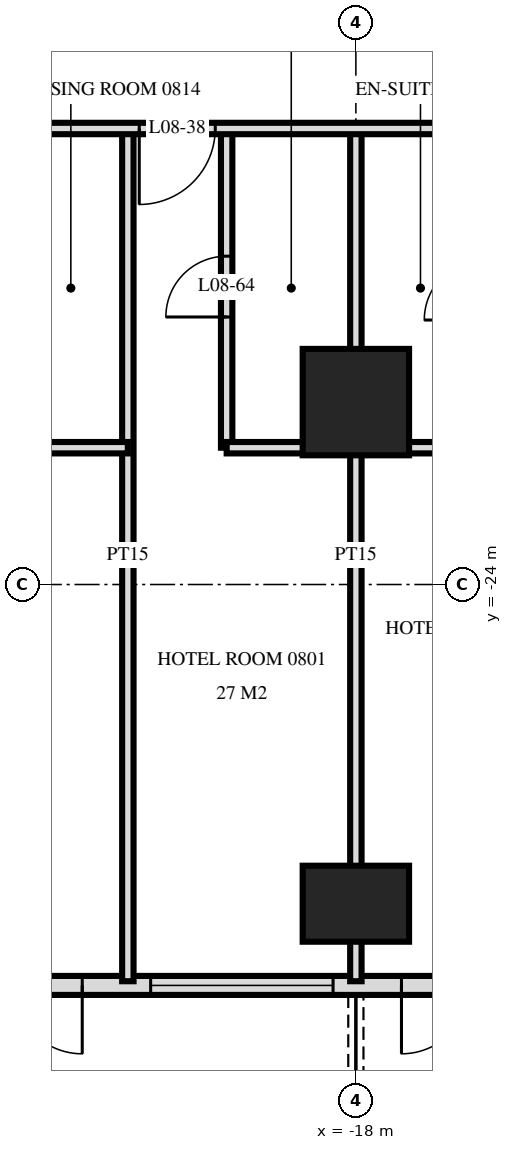
"""IFC4 building model, lengths in metres.
Left out: names, types, materials, properties, quantities, classifications, styles, units other than length and angle.
Written with IfcOpenShell. Run it as: python <this file> out.ifc"""

import sys

from ifc_helpers import new_model, si_unit, direction, frame, frame_2d, origin, origin_2d, place, context, subcontext, project, spatial, rectangle, extrude, element, fill, save


model = new_model("IFC4")
c1 = context("Model", 3, precision=1e-05, world=origin(), true_north=direction((0.0, 1.0)))
c2 = subcontext(c1, "Body", "Model", "MODEL_VIEW")
j1 = project(units=[si_unit("LENGTHUNIT", "METRE"), si_unit("PLANEANGLEUNIT", "RADIAN")], contexts=[c1])
p1 = place(None, origin())
s1 = spatial("IfcSite", under=j1, at=p1, CompositionType="ELEMENT")
p2 = place(p1, origin())
s2 = spatial("IfcBuilding", under=s1, at=p2, CompositionType="ELEMENT")
p3 = place(p2, frame((0.0, 0.0, 38.4)))
s3 = spatial("IfcBuildingStorey", under=s2, at=p3, CompositionType="ELEMENT", Elevation=38.4)
p4 = place(p3, frame((-18.0, -28.2, 0.0), z_axis=(0.0, 0.0, 1.0), x_axis=(1.0, 0.0, 0.0)))
e1 = element("IfcColumn", 1, at=p4, inside=s3, PredefinedType="COLUMN", context=c2, shape_type="SweptSolid", body=[
    extrude(rectangle(XDim=1.4, YDim=1.0, at=origin_2d()), origin(), (0.0, 0.0, 1.0), 3.6),
])
p5 = place(p3, frame((-18.0, -21.6, 0.0), z_axis=(0.0, 0.0, 1.0), x_axis=(1.0, 0.0, 0.0)))
e2 = element("IfcColumn", 2, at=p5, inside=s3, PredefinedType="COLUMN", context=c2, shape_type="SweptSolid", body=[
    extrude(rectangle(XDim=1.4, YDim=1.4, at=origin_2d()), origin(), (0.0, 0.0, 1.0), 3.6),
])
p6 = place(p3, frame((-28.775, -29.275, 0.0), z_axis=(0.0, 0.0, 1.0), x_axis=(1.0, 0.0, 0.0)))
e3 = element("IfcWall", 3, at=p6, inside=s3, PredefinedType="SOLIDWALL", context=c2, shape_type="SweptSolid", body=[
    extrude(rectangle(XDim=57.551, YDim=0.25, at=frame_2d((28.775, 0.0))), origin(), (0.0, 0.0, 1.0), 3.32),
])
p7 = place(p6, frame((0.575, 0.0, 0.0)))
e4 = element("IfcOpeningElement", 4, at=p7, cuts=e3, PredefinedType="OPENING", context=c2, shape_type="SweptSolid", body=[
    extrude(rectangle(XDim=1.8, YDim=2.4, at=frame_2d((0.9, 1.2))), frame((0.0, 0.135, 0.0), z_axis=(0.0, -1.0, 0.0), x_axis=(1.0, 0.0, 0.0)), (0.0, 0.0, 1.0), 0.27),
])
p8 = place(p6, frame((5.375, 0.0, 0.0)))
e5 = element("IfcOpeningElement", 5, at=p8, cuts=e3, PredefinedType="OPENING", context=c2, shape_type="SweptSolid", body=[
    extrude(rectangle(XDim=1.8, YDim=2.4, at=frame_2d((0.9, 1.2))), frame((0.0, 0.135, 0.0), z_axis=(0.0, -1.0, 0.0), x_axis=(1.0, 0.0, 0.0)), (0.0, 0.0, 1.0), 0.27),
])
p9 = place(p6, frame((8.075, 0.0, 0.3)))
e6 = element("IfcOpeningElement", 6, at=p9, cuts=e3, PredefinedType="OPENING", context=c2, shape_type="SweptSolid", body=[
    extrude(rectangle(XDim=2.4, YDim=2.1, at=frame_2d((1.2, 1.05))), frame((0.0, 0.135, 0.0), z_axis=(0.0, -1.0, 0.0), x_axis=(1.0, 0.0, 0.0)), (0.0, 0.0, 1.0), 0.27),
])
p10 = place(p6, frame((11.375, 0.0, 0.0)))
e7 = element("IfcOpeningElement", 7, at=p10, cuts=e3, PredefinedType="OPENING", context=c2, shape_type="SweptSolid", body=[
    extrude(rectangle(XDim=1.8, YDim=2.4, at=frame_2d((0.9, 1.2))), frame((0.0, 0.135, 0.0), z_axis=(0.0, -1.0, 0.0), x_axis=(1.0, 0.0, 0.0)), (0.0, 0.0, 1.0), 0.27),
])
p11 = place(p6, frame((14.075, 0.0, 0.3)))
e8 = element("IfcOpeningElement", 8, at=p11, cuts=e3, PredefinedType="OPENING", context=c2, shape_type="SweptSolid", body=[
    extrude(rectangle(XDim=2.4, YDim=2.1, at=frame_2d((1.2, 1.05))), frame((0.0, 0.135, 0.0), z_axis=(0.0, -1.0, 0.0), x_axis=(1.0, 0.0, 0.0)), (0.0, 0.0, 1.0), 0.27),
])
p12 = place(p6, frame((17.375, 0.0, 0.0)))
e9 = element("IfcOpeningElement", 9, at=p12, cuts=e3, PredefinedType="OPENING", context=c2, shape_type="SweptSolid", body=[
    extrude(rectangle(XDim=1.8, YDim=2.4, at=frame_2d((0.9, 1.2))), frame((0.0, 0.135, 0.0), z_axis=(0.0, -1.0, 0.0), x_axis=(1.0, 0.0, 0.0)), (0.0, 0.0, 1.0), 0.27),
])
p13 = place(p6, frame((20.075, 0.0, 0.3)))
e10 = element("IfcOpeningElement", 10, at=p13, cuts=e3, PredefinedType="OPENING", context=c2, shape_type="SweptSolid", body=[
    extrude(rectangle(XDim=2.4, YDim=2.1, at=frame_2d((1.2, 1.05))), frame((0.0, 0.135, 0.0), z_axis=(0.0, -1.0, 0.0), x_axis=(1.0, 0.0, 0.0)), (0.0, 0.0, 1.0), 0.27),
])
p14 = place(p6, frame((23.075, 0.0, 0.3)))
e11 = element("IfcOpeningElement", 11, at=p14, cuts=e3, PredefinedType="OPENING", context=c2, shape_type="SweptSolid", body=[
    extrude(rectangle(XDim=2.4, YDim=2.1, at=frame_2d((1.2, 1.05))), frame((0.0, 0.135, 0.0), z_axis=(0.0, -1.0, 0.0), x_axis=(1.0, 0.0, 0.0)), (0.0, 0.0, 1.0), 0.27),
])
p15 = place(p6, frame((26.375, 0.0, 0.0)))
e12 = element("IfcOpeningElement", 12, at=p15, cuts=e3, PredefinedType="OPENING", context=c2, shape_type="SweptSolid", body=[
    extrude(rectangle(XDim=1.8, YDim=2.4, at=frame_2d((0.9, 1.2))), frame((0.0, 0.135, 0.0), z_axis=(0.0, -1.0, 0.0), x_axis=(1.0, 0.0, 0.0)), (0.0, 0.0, 1.0), 0.27),
])
p16 = place(p6, frame((29.375, 0.0, 0.0)))
e13 = element("IfcOpeningElement", 13, at=p16, cuts=e3, PredefinedType="OPENING", context=c2, shape_type="SweptSolid", body=[
    extrude(rectangle(XDim=1.8, YDim=2.4, at=frame_2d((0.9, 1.2))), frame((0.0, 0.135, 0.0), z_axis=(0.0, -1.0, 0.0), x_axis=(1.0, 0.0, 0.0)), (0.0, 0.0, 1.0), 0.27),
])
p17 = place(p6, frame((32.075, 0.0, 0.3)))
e14 = element("IfcOpeningElement", 14, at=p17, cuts=e3, PredefinedType="OPENING", context=c2, shape_type="SweptSolid", body=[
    extrude(rectangle(XDim=2.4, YDim=2.1, at=frame_2d((1.2, 1.05))), frame((0.0, 0.135, 0.0), z_axis=(0.0, -1.0, 0.0), x_axis=(1.0, 0.0, 0.0)), (0.0, 0.0, 1.0), 0.27),
])
p18 = place(p6, frame((35.375, 0.0, 0.0)))
e15 = element("IfcOpeningElement", 15, at=p18, cuts=e3, PredefinedType="OPENING", context=c2, shape_type="SweptSolid", body=[
    extrude(rectangle(XDim=1.8, YDim=2.4, at=frame_2d((0.9, 1.2))), frame((0.0, 0.135, 0.0), z_axis=(0.0, -1.0, 0.0), x_axis=(1.0, 0.0, 0.0)), (0.0, 0.0, 1.0), 0.27),
])
p19 = place(p6, frame((38.075, 0.0, 0.3)))
e16 = element("IfcOpeningElement", 16, at=p19, cuts=e3, PredefinedType="OPENING", context=c2, shape_type="SweptSolid", body=[
    extrude(rectangle(XDim=2.4, YDim=2.1, at=frame_2d((1.2, 1.05))), frame((0.0, 0.135, 0.0), z_axis=(0.0, -1.0, 0.0), x_axis=(1.0, 0.0, 0.0)), (0.0, 0.0, 1.0), 0.27),
])
p20 = place(p6, frame((41.375, 0.0, 0.0)))
e17 = element("IfcOpeningElement", 17, at=p20, cuts=e3, PredefinedType="OPENING", context=c2, shape_type="SweptSolid", body=[
    extrude(rectangle(XDim=1.8, YDim=2.4, at=frame_2d((0.9, 1.2))), frame((0.0, 0.135, 0.0), z_axis=(0.0, -1.0, 0.0), x_axis=(1.0, 0.0, 0.0)), (0.0, 0.0, 1.0), 0.27),
])
p21 = place(p6, frame((44.075, 0.0, 0.3)))
e18 = element("IfcOpeningElement", 18, at=p21, cuts=e3, PredefinedType="OPENING", context=c2, shape_type="SweptSolid", body=[
    extrude(rectangle(XDim=2.4, YDim=2.1, at=frame_2d((1.2, 1.05))), frame((0.0, 0.135, 0.0), z_axis=(0.0, -1.0, 0.0), x_axis=(1.0, 0.0, 0.0)), (0.0, 0.0, 1.0), 0.27),
])
p22 = place(p6, frame((47.375, 0.0, 0.0)))
e19 = element("IfcOpeningElement", 19, at=p22, cuts=e3, PredefinedType="OPENING", context=c2, shape_type="SweptSolid", body=[
    extrude(rectangle(XDim=1.8, YDim=2.4, at=frame_2d((0.9, 1.2))), frame((0.0, 0.135, 0.0), z_axis=(0.0, -1.0, 0.0), x_axis=(1.0, 0.0, 0.0)), (0.0, 0.0, 1.0), 0.27),
])
p23 = place(p6, frame((50.075, 0.0, 0.3)))
e20 = element("IfcOpeningElement", 20, at=p23, cuts=e3, PredefinedType="OPENING", context=c2, shape_type="SweptSolid", body=[
    extrude(rectangle(XDim=2.4, YDim=2.1, at=frame_2d((1.2, 1.05))), frame((0.0, 0.135, 0.0), z_axis=(0.0, -1.0, 0.0), x_axis=(1.0, 0.0, 0.0)), (0.0, 0.0, 1.0), 0.27),
])
p24 = place(p6, frame((53.375, 0.0, 0.0)))
e21 = element("IfcOpeningElement", 21, at=p24, cuts=e3, PredefinedType="OPENING", context=c2, shape_type="SweptSolid", body=[
    extrude(rectangle(XDim=1.8, YDim=2.4, at=frame_2d((0.9, 1.2))), frame((0.0, 0.135, 0.0), z_axis=(0.0, -1.0, 0.0), x_axis=(1.0, 0.0, 0.0)), (0.0, 0.0, 1.0), 0.27),
])
p25 = place(p3, frame((-18.0, -29.22, 0.0), z_axis=(0.0, 0.0, 1.0), x_axis=(0.0, 1.0, 0.0)))
e22 = element("IfcWall", 22, at=p25, inside=s3, PredefinedType="PARTITIONING", context=c2, shape_type="SweptSolid", body=[
    extrude(rectangle(XDim=11.22, YDim=0.15, at=frame_2d((5.61, 0.0))), origin(), (0.0, 0.0, 1.0), 3.32),
])
p26 = place(p3, frame((-19.7, -22.2, 0.0), z_axis=(0.0, 0.0, 1.0), x_axis=(0.0, 1.0, 0.0)))
e23 = element("IfcWall", 23, at=p26, inside=s3, PredefinedType="PARTITIONING", context=c2, shape_type="SweptSolid", body=[
    extrude(rectangle(XDim=4.2, YDim=0.15, at=frame_2d((2.1, 0.0))), origin(), (0.0, 0.0, 1.0), 3.32),
])
p27 = place(p26, frame((1.72, 0.0, 0.0)))
e24 = element("IfcOpeningElement", 24, at=p27, cuts=e23, PredefinedType="OPENING", context=c2, shape_type="SweptSolid", body=[
    extrude(rectangle(XDim=0.8, YDim=2.1, at=frame_2d((0.4, 1.05))), frame((0.0, 0.085, 0.0), z_axis=(0.0, -1.0, 0.0), x_axis=(1.0, 0.0, 0.0)), (0.0, 0.0, 1.0), 0.17),
])
p28 = place(p3, frame((-21.0, -29.22, 0.0), z_axis=(0.0, 0.0, 1.0), x_axis=(0.0, 1.0, 0.0)))
e25 = element("IfcWall", 25, at=p28, inside=s3, PredefinedType="PARTITIONING", context=c2, shape_type="SweptSolid", body=[
    extrude(rectangle(XDim=11.22, YDim=0.15, at=frame_2d((5.61, 0.0))), origin(), (0.0, 0.0, 1.0), 3.32),
])
p29 = place(p3, frame((-22.5, -22.2, 0.0), z_axis=(0.0, 0.0, 1.0), x_axis=(1.0, 0.0, 0.0)))
e26 = element("IfcWall", 26, at=p29, inside=s3, PredefinedType="PARTITIONING", context=c2, shape_type="SweptSolid", body=[
    extrude(rectangle(XDim=1.5, YDim=0.15, at=frame_2d((0.75, 0.0))), origin(), (0.0, 0.0, 1.0), 3.32),
])
p30 = place(p3, frame((-19.7, -22.2, 0.0), z_axis=(0.0, 0.0, 1.0), x_axis=(1.0, 0.0, 0.0)))
e27 = element("IfcWall", 27, at=p30, inside=s3, PredefinedType="PARTITIONING", context=c2, shape_type="SweptSolid", body=[
    extrude(rectangle(XDim=3.4, YDim=0.15, at=frame_2d((1.7, 0.0))), origin(), (0.0, 0.0, 1.0), 3.32),
])
p31 = place(p3, frame((-33.12, -18.0, 0.0), z_axis=(0.0, 0.0, 1.0), x_axis=(1.0, 0.0, 0.0)))
e28 = element("IfcWall", 28, at=p31, inside=s3, PredefinedType="PARTITIONING", context=c2, shape_type="SweptSolid", body=[
    extrude(rectangle(XDim=66.24, YDim=0.15, at=frame_2d((33.12, 0.0))), origin(), (0.0, 0.0, 1.0), 3.32),
])
p32 = place(p31, frame((12.27, 0.0, 0.0)))
e29 = element("IfcOpeningElement", 29, at=p32, cuts=e28, PredefinedType="OPENING", context=c2, shape_type="SweptSolid", body=[
    extrude(rectangle(XDim=1.0, YDim=2.1, at=frame_2d((0.5, 1.05))), frame((0.0, 0.085, 0.0), z_axis=(0.0, -1.0, 0.0), x_axis=(1.0, 0.0, 0.0)), (0.0, 0.0, 1.0), 0.17),
])
p33 = place(p31, frame((16.97, 0.0, 0.0)))
e30 = element("IfcOpeningElement", 30, at=p33, cuts=e28, PredefinedType="OPENING", context=c2, shape_type="SweptSolid", body=[
    extrude(rectangle(XDim=1.0, YDim=2.1, at=frame_2d((0.5, 1.05))), frame((0.0, 0.085, 0.0), z_axis=(0.0, -1.0, 0.0), x_axis=(1.0, 0.0, 0.0)), (0.0, 0.0, 1.0), 0.17),
])
p34 = place(p31, frame((18.27, 0.0, 0.0)))
e31 = element("IfcOpeningElement", 31, at=p34, cuts=e28, PredefinedType="OPENING", context=c2, shape_type="SweptSolid", body=[
    extrude(rectangle(XDim=1.0, YDim=2.1, at=frame_2d((0.5, 1.05))), frame((0.0, 0.085, 0.0), z_axis=(0.0, -1.0, 0.0), x_axis=(1.0, 0.0, 0.0)), (0.0, 0.0, 1.0), 0.17),
])
p35 = place(p31, frame((22.97, 0.0, 0.0)))
e32 = element("IfcOpeningElement", 32, at=p35, cuts=e28, PredefinedType="OPENING", context=c2, shape_type="SweptSolid", body=[
    extrude(rectangle(XDim=1.0, YDim=2.1, at=frame_2d((0.5, 1.05))), frame((0.0, 0.085, 0.0), z_axis=(0.0, -1.0, 0.0), x_axis=(1.0, 0.0, 0.0)), (0.0, 0.0, 1.0), 0.17),
])
p36 = place(p31, frame((24.27, 0.0, 0.0)))
e33 = element("IfcOpeningElement", 33, at=p36, cuts=e28, PredefinedType="OPENING", context=c2, shape_type="SweptSolid", body=[
    extrude(rectangle(XDim=1.0, YDim=2.1, at=frame_2d((0.5, 1.05))), frame((0.0, 0.085, 0.0), z_axis=(0.0, -1.0, 0.0), x_axis=(1.0, 0.0, 0.0)), (0.0, 0.0, 1.0), 0.17),
])
p37 = place(p31, frame((28.97, 0.0, 0.0)))
e34 = element("IfcOpeningElement", 34, at=p37, cuts=e28, PredefinedType="OPENING", context=c2, shape_type="SweptSolid", body=[
    extrude(rectangle(XDim=1.0, YDim=2.1, at=frame_2d((0.5, 1.05))), frame((0.0, 0.085, 0.0), z_axis=(0.0, -1.0, 0.0), x_axis=(1.0, 0.0, 0.0)), (0.0, 0.0, 1.0), 0.17),
])
p38 = place(p31, frame((30.27, 0.0, 0.0)))
e35 = element("IfcOpeningElement", 35, at=p38, cuts=e28, PredefinedType="OPENING", context=c2, shape_type="SweptSolid", body=[
    extrude(rectangle(XDim=1.0, YDim=2.1, at=frame_2d((0.5, 1.05))), frame((0.0, 0.085, 0.0), z_axis=(0.0, -1.0, 0.0), x_axis=(1.0, 0.0, 0.0)), (0.0, 0.0, 1.0), 0.17),
])
p39 = place(p31, frame((34.97, 0.0, 0.0)))
e36 = element("IfcOpeningElement", 36, at=p39, cuts=e28, PredefinedType="OPENING", context=c2, shape_type="SweptSolid", body=[
    extrude(rectangle(XDim=1.0, YDim=2.1, at=frame_2d((0.5, 1.05))), frame((0.0, 0.085, 0.0), z_axis=(0.0, -1.0, 0.0), x_axis=(1.0, 0.0, 0.0)), (0.0, 0.0, 1.0), 0.17),
])
p40 = place(p31, frame((37.27, 0.0, 0.0)))
e37 = element("IfcOpeningElement", 37, at=p40, cuts=e28, PredefinedType="OPENING", context=c2, shape_type="SweptSolid", body=[
    extrude(rectangle(XDim=1.0, YDim=2.1, at=frame_2d((0.5, 1.05))), frame((0.0, 0.085, 0.0), z_axis=(0.0, -1.0, 0.0), x_axis=(1.0, 0.0, 0.0)), (0.0, 0.0, 1.0), 0.17),
])
p41 = place(p31, frame((43.97, 0.0, 0.0)))
e38 = element("IfcOpeningElement", 38, at=p41, cuts=e28, PredefinedType="OPENING", context=c2, shape_type="SweptSolid", body=[
    extrude(rectangle(XDim=1.0, YDim=2.1, at=frame_2d((0.5, 1.05))), frame((0.0, 0.085, 0.0), z_axis=(0.0, -1.0, 0.0), x_axis=(1.0, 0.0, 0.0)), (0.0, 0.0, 1.0), 0.17),
])
p42 = place(p31, frame((45.27, 0.0, 0.0)))
e39 = element("IfcOpeningElement", 39, at=p42, cuts=e28, PredefinedType="OPENING", context=c2, shape_type="SweptSolid", body=[
    extrude(rectangle(XDim=1.0, YDim=2.1, at=frame_2d((0.5, 1.05))), frame((0.0, 0.085, 0.0), z_axis=(0.0, -1.0, 0.0), x_axis=(1.0, 0.0, 0.0)), (0.0, 0.0, 1.0), 0.17),
])
p43 = place(p31, frame((51.22, 0.0, 0.0)))
e40 = element("IfcOpeningElement", 40, at=p43, cuts=e28, PredefinedType="OPENING", context=c2, shape_type="SweptSolid", body=[
    extrude(rectangle(XDim=1.0, YDim=2.1, at=frame_2d((0.5, 1.05))), frame((0.0, 0.085, 0.0), z_axis=(0.0, -1.0, 0.0), x_axis=(1.0, 0.0, 0.0)), (0.0, 0.0, 1.0), 0.17),
])
p44 = place(p31, frame((54.27, 0.0, 0.0)))
e41 = element("IfcOpeningElement", 41, at=p44, cuts=e28, PredefinedType="OPENING", context=c2, shape_type="SweptSolid", body=[
    extrude(rectangle(XDim=1.0, YDim=2.1, at=frame_2d((0.5, 1.05))), frame((0.0, 0.085, 0.0), z_axis=(0.0, -1.0, 0.0), x_axis=(1.0, 0.0, 0.0)), (0.0, 0.0, 1.0), 0.17),
])
p45 = place(p31, frame((6.07, 0.0, 0.0)))
e42 = element("IfcOpeningElement", 42, at=p45, cuts=e28, PredefinedType="OPENING", context=c2, shape_type="SweptSolid", body=[
    extrude(rectangle(XDim=1.0, YDim=2.1, at=frame_2d((0.5, 1.05))), frame((0.0, 0.085, 0.0), z_axis=(0.0, -1.0, 0.0), x_axis=(1.0, 0.0, 0.0)), (0.0, 0.0, 1.0), 0.17),
])
p46 = place(p31, frame((63.37, 0.0, 0.0)))
e43 = element("IfcOpeningElement", 43, at=p46, cuts=e28, PredefinedType="OPENING", context=c2, shape_type="SweptSolid", body=[
    extrude(rectangle(XDim=1.0, YDim=2.1, at=frame_2d((0.5, 1.05))), frame((0.0, 0.085, 0.0), z_axis=(0.0, -1.0, 0.0), x_axis=(1.0, 0.0, 0.0)), (0.0, 0.0, 1.0), 0.17),
])
p47 = place(p8, frame((0.9, 0.0, 0.0), z_axis=(0.0, 0.0, 1.0), x_axis=(-1.0, 0.0, 0.0)))
e44 = element("IfcDoor", 44, at=p47, inside=s3, OperationType="DOUBLE_DOOR_SINGLE_SWING", PredefinedType="DOOR", context=c2, shape_type="SweptSolid", body=[
    extrude(rectangle(XDim=1.8, YDim=2.4, at=frame_2d((0.0, 1.2))), frame((0.0, -0.025, 0.0), z_axis=(0.0, 1.0, 0.0), x_axis=(-1.0, 0.0, 0.0)), (0.0, 0.0, 1.0), 0.05),
])
fill(e5, e44)
p48 = place(p9, origin())
e45 = element("IfcWindow", 45, at=p48, inside=s3, PartitioningType="SINGLE_PANEL", PredefinedType="WINDOW", context=c2, shape_type="SweptSolid", body=[
    extrude(rectangle(XDim=2.4, YDim=2.1, at=frame_2d((1.2, 1.05))), frame((0.0, 0.03, 0.0), z_axis=(0.0, -1.0, 0.0), x_axis=(1.0, 0.0, 0.0)), (0.0, 0.0, 1.0), 0.06),
])
fill(e6, e45)
p49 = place(p10, frame((0.9, 0.0, 0.0), z_axis=(0.0, 0.0, 1.0), x_axis=(-1.0, 0.0, 0.0)))
e46 = element("IfcDoor", 46, at=p49, inside=s3, OperationType="DOUBLE_DOOR_SINGLE_SWING", PredefinedType="DOOR", context=c2, shape_type="SweptSolid", body=[
    extrude(rectangle(XDim=1.8, YDim=2.4, at=frame_2d((0.0, 1.2))), frame((0.0, -0.025, 0.0), z_axis=(0.0, 1.0, 0.0), x_axis=(-1.0, 0.0, 0.0)), (0.0, 0.0, 1.0), 0.05),
])
fill(e7, e46)
p50 = place(p32, frame((0.5, 0.0, 0.0), z_axis=(0.0, 0.0, 1.0), x_axis=(-1.0, 0.0, 0.0)))
e47 = element("IfcDoor", 47, at=p50, inside=s3, OperationType="SINGLE_SWING_LEFT", PredefinedType="DOOR", context=c2, shape_type="SweptSolid", body=[
    extrude(rectangle(XDim=1.0, YDim=2.1, at=frame_2d((0.0, 1.05))), frame((0.0, -0.025, 0.0), z_axis=(0.0, 1.0, 0.0), x_axis=(-1.0, 0.0, 0.0)), (0.0, 0.0, 1.0), 0.05),
])
fill(e29, e47)
p51 = place(p27, origin())
e48 = element("IfcDoor", 48, at=p51, inside=s3, OperationType="SINGLE_SWING_RIGHT", PredefinedType="DOOR", context=c2, shape_type="SweptSolid", body=[
    extrude(rectangle(XDim=0.8, YDim=2.1, at=frame_2d((0.4, 1.05))), frame((0.0, 0.025, 0.0), z_axis=(0.0, -1.0, 0.0), x_axis=(1.0, 0.0, 0.0)), (0.0, 0.0, 1.0), 0.05),
])
fill(e24, e48)
save(model, sys.argv[1])
